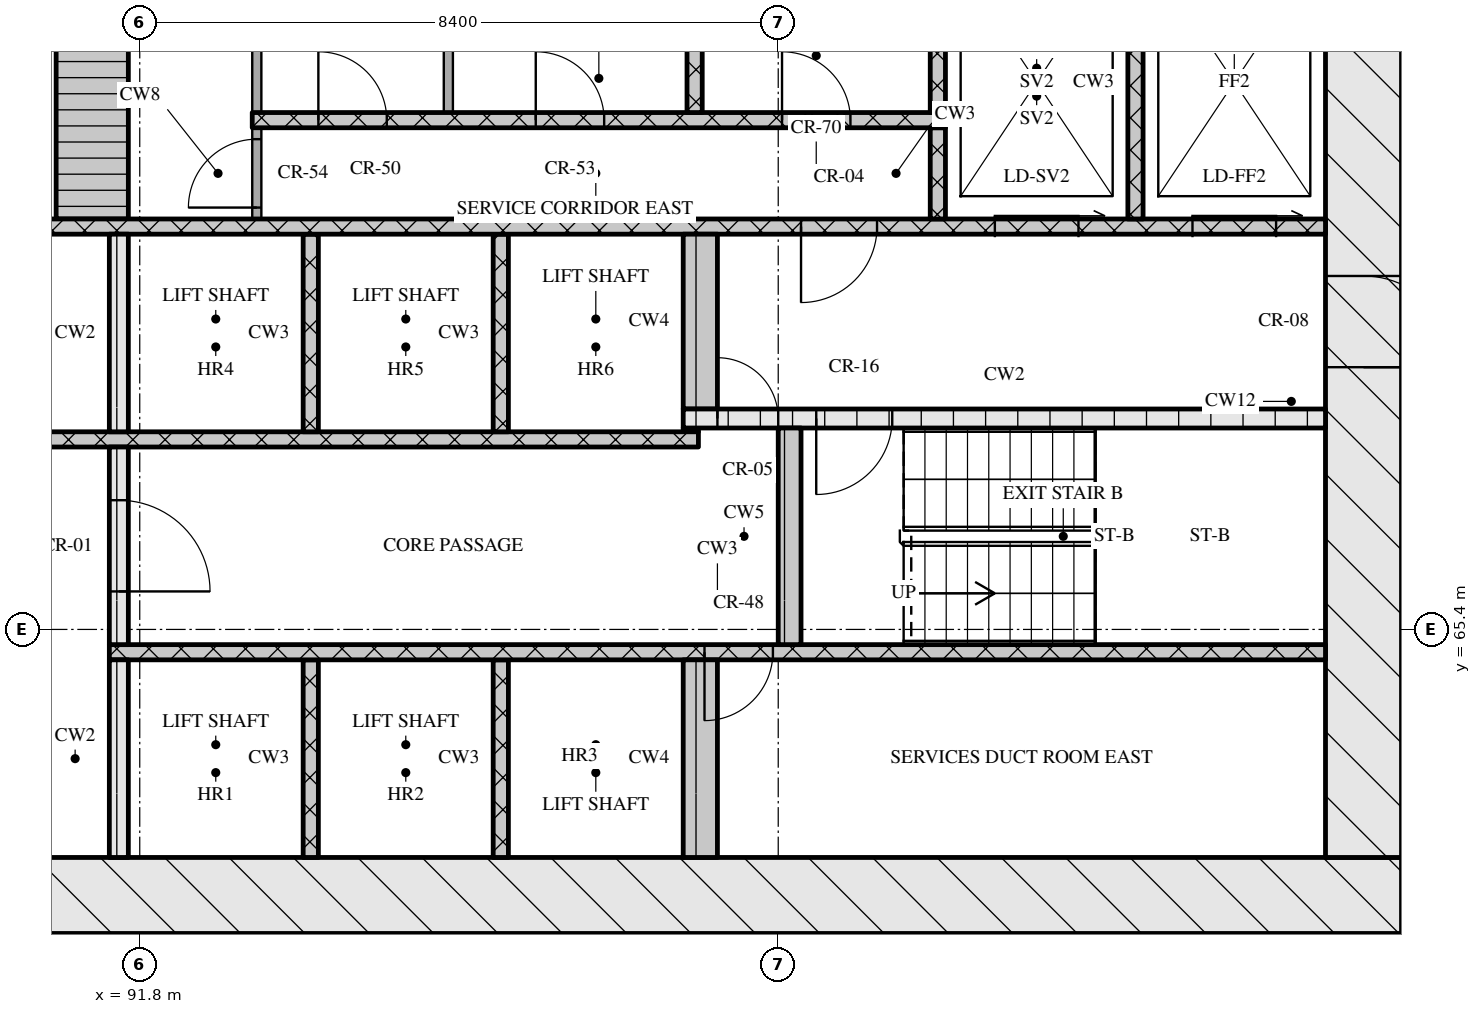
"""IFC4 building model, lengths in metres.
Left out: names, types, materials, properties, quantities, classifications, styles, units other than length and angle.
Written with IfcOpenShell. Run it as: python <this file> out.ifc"""

import sys

from ifc_helpers import new_model, si_unit, direction, frame, frame_2d, origin, place, context, subcontext, project, spatial, rectangle, extrude, element, fill, save


model = new_model("IFC4")
c1 = context("Model", 3, precision=1e-05, world=origin(), true_north=direction((0.0, 1.0)))
c2 = subcontext(c1, "Body", "Model", "MODEL_VIEW")
j1 = project(units=[si_unit("LENGTHUNIT", "METRE"), si_unit("PLANEANGLEUNIT", "RADIAN")], contexts=[c1])
p1 = place(None, origin())
s1 = spatial("IfcSite", under=j1, at=p1, CompositionType="ELEMENT")
p2 = place(p1, origin())
s2 = spatial("IfcBuilding", under=s1, at=p2, CompositionType="ELEMENT")
p3 = place(p2, frame((0.0, 0.0, 102.45)))
s3 = spatial("IfcBuildingStorey", under=s2, at=p3, CompositionType="ELEMENT", Elevation=102.45)
p4 = place(p3, frame((66.8, 61.9, 0.0), z_axis=(0.0, 0.0, 1.0), x_axis=(1.0, 0.0, 0.0)))
e1 = element("IfcWall", 1, at=p4, inside=s3, PredefinedType="SOLIDWALL", context=c2, shape_type="SweptSolid", body=[
    extrude(rectangle(XDim=41.6, YDim=1.0, at=frame_2d((20.8, 0.0))), origin(), (0.0, 0.0, 1.0), 3.32),
])
p5 = place(p4, frame((21.15, 0.0, 0.0)))
e2 = element("IfcOpeningElement", 2, at=p5, cuts=e1, PredefinedType="OPENING", context=c2, shape_type="SweptSolid", body=[
    extrude(rectangle(XDim=1.8, YDim=2.1, at=frame_2d((0.9, 1.05))), frame((0.0, 0.51, 0.0), z_axis=(0.0, -1.0, 0.0), x_axis=(1.0, 0.0, 0.0)), (0.0, 0.0, 1.0), 1.02),
])
p6 = place(p3, frame((107.9, 62.4, 0.0), z_axis=(0.0, 0.0, 1.0), x_axis=(0.0, 1.0, 0.0)))
e3 = element("IfcWall", 3, at=p6, inside=s3, PredefinedType="SOLIDWALL", context=c2, shape_type="SweptSolid", body=[
    extrude(rectangle(XDim=12.0, YDim=1.0, at=frame_2d((6.0, 0.0))), origin(), (0.0, 0.0, 1.0), 3.32),
])
p7 = place(p6, frame((6.45, 0.0, 0.0)))
e4 = element("IfcOpeningElement", 4, at=p7, cuts=e3, PredefinedType="OPENING", context=c2, shape_type="SweptSolid", body=[
    extrude(rectangle(XDim=1.2, YDim=2.1, at=frame_2d((0.6, 1.05))), frame((0.0, 0.51, 0.0), z_axis=(0.0, -1.0, 0.0), x_axis=(1.0, 0.0, 0.0)), (0.0, 0.0, 1.0), 1.02),
])
p8 = place(p3, frame((91.525, 62.4, 0.0), z_axis=(0.0, 0.0, 1.0), x_axis=(0.0, 1.0, 0.0)))
e5 = element("IfcWall", 5, at=p8, inside=s3, PredefinedType="SOLIDWALL", context=c2, shape_type="SweptSolid", body=[
    extrude(rectangle(XDim=2.6, YDim=0.25, at=frame_2d((1.3, 0.0))), origin(), (0.0, 0.0, 1.0), 3.32),
])
for number, where, z_axis, x_axis in (
    (6, (94.05, 62.4, 0.0), (0.0, 0.0, 1.0), (0.0, 1.0, 0.0)),
    (7, (96.55, 62.4, 0.0), (0.0, 0.0, 1.0), (0.0, 1.0, 0.0)),
):
    element("IfcWall", number, at=place(p3, frame(where, z_axis=z_axis, x_axis=x_axis)), inside=s3, PredefinedType="SOLIDWALL", context=c2, shape_type="SweptSolid", body=[
        extrude(rectangle(XDim=2.6, YDim=0.2, at=frame_2d((1.3, 0.0))), origin(), (0.0, 0.0, 1.0), 3.32),
    ])
p9 = place(p3, frame((99.175, 62.4, 0.0), z_axis=(0.0, 0.0, 1.0), x_axis=(0.0, 1.0, 0.0)))
e8 = element("IfcWall", 8, at=p9, inside=s3, PredefinedType="SOLIDWALL", context=c2, shape_type="SweptSolid", body=[
    extrude(rectangle(XDim=2.6, YDim=0.45, at=frame_2d((1.3, 0.0))), origin(), (0.0, 0.0, 1.0), 3.32),
])
p10 = place(p3, frame((91.4, 65.1, 0.0), z_axis=(0.0, 0.0, 1.0), x_axis=(1.0, 0.0, 0.0)))
e9 = element("IfcWall", 9, at=p10, inside=s3, PredefinedType="SOLIDWALL", context=c2, shape_type="SweptSolid", body=[
    extrude(rectangle(XDim=16.0, YDim=0.2, at=frame_2d((8.0, 0.0))), origin(), (0.0, 0.0, 1.0), 3.32),
])
p11 = place(p10, frame((7.83, 0.0, 0.0)))
e10 = element("IfcOpeningElement", 10, at=p11, cuts=e9, PredefinedType="OPENING", context=c2, shape_type="SweptSolid", body=[
    extrude(rectangle(XDim=0.9, YDim=2.1, at=frame_2d((0.45, 1.05))), frame((0.0, 0.11, 0.0), z_axis=(0.0, -1.0, 0.0), x_axis=(1.0, 0.0, 0.0)), (0.0, 0.0, 1.0), 0.22),
])
p12 = place(p3, frame((91.525, 65.2, 0.0), z_axis=(0.0, 0.0, 1.0), x_axis=(0.0, 1.0, 0.0)))
e11 = element("IfcWall", 11, at=p12, inside=s3, PredefinedType="SOLIDWALL", context=c2, shape_type="SweptSolid", body=[
    extrude(rectangle(XDim=2.6, YDim=0.25, at=frame_2d((1.3, 0.0))), origin(), (0.0, 0.0, 1.0), 3.32),
])
p13 = place(p12, frame((0.7, 0.0, 0.0)))
e12 = element("IfcOpeningElement", 12, at=p13, cuts=e11, PredefinedType="OPENING", context=c2, shape_type="SweptSolid", body=[
    extrude(rectangle(XDim=1.2, YDim=2.1, at=frame_2d((0.6, 1.05))), frame((0.0, 0.135, 0.0), z_axis=(0.0, -1.0, 0.0), x_axis=(1.0, 0.0, 0.0)), (0.0, 0.0, 1.0), 0.27),
])
p14 = place(p3, frame((100.35, 65.2, 0.0), z_axis=(0.0, 0.0, 1.0), x_axis=(0.0, 1.0, 0.0)))
e13 = element("IfcWall", 13, at=p14, inside=s3, PredefinedType="SOLIDWALL", context=c2, shape_type="SweptSolid", body=[
    extrude(rectangle(XDim=2.85, YDim=0.3, at=frame_2d((1.425, 0.0))), origin(), (0.0, 0.0, 1.0), 3.32),
])
p15 = place(p3, frame((76.05, 67.9, 0.0), z_axis=(0.0, 0.0, 1.0), x_axis=(1.0, 0.0, 0.0)))
e14 = element("IfcWall", 14, at=p15, inside=s3, PredefinedType="SOLIDWALL", context=c2, shape_type="SweptSolid", body=[
    extrude(rectangle(XDim=23.1, YDim=0.2, at=frame_2d((11.55, 0.0))), origin(), (0.0, 0.0, 1.0), 3.32),
])
p16 = place(p15, frame((0.6, 0.0, 0.0)))
e15 = element("IfcOpeningElement", 15, at=p16, cuts=e14, PredefinedType="OPENING", context=c2, shape_type="SweptSolid", body=[
    extrude(rectangle(XDim=1.1, YDim=2.1, at=frame_2d((0.55, 1.05))), frame((0.0, 0.11, 0.0), z_axis=(0.0, -1.0, 0.0), x_axis=(1.0, 0.0, 0.0)), (0.0, 0.0, 1.0), 0.22),
])
p17 = place(p15, frame((3.1, 0.0, 0.0)))
e16 = element("IfcOpeningElement", 16, at=p17, cuts=e14, PredefinedType="OPENING", context=c2, shape_type="SweptSolid", body=[
    extrude(rectangle(XDim=1.1, YDim=2.1, at=frame_2d((0.55, 1.05))), frame((0.0, 0.11, 0.0), z_axis=(0.0, -1.0, 0.0), x_axis=(1.0, 0.0, 0.0)), (0.0, 0.0, 1.0), 0.22),
])
p18 = place(p15, frame((5.6, 0.0, 0.0)))
e17 = element("IfcOpeningElement", 17, at=p18, cuts=e14, PredefinedType="OPENING", context=c2, shape_type="SweptSolid", body=[
    extrude(rectangle(XDim=1.1, YDim=2.1, at=frame_2d((0.55, 1.05))), frame((0.0, 0.11, 0.0), z_axis=(0.0, -1.0, 0.0), x_axis=(1.0, 0.0, 0.0)), (0.0, 0.0, 1.0), 0.22),
])
p19 = place(p15, frame((8.45, 0.0, 0.0)))
e18 = element("IfcOpeningElement", 18, at=p19, cuts=e14, PredefinedType="OPENING", context=c2, shape_type="SweptSolid", body=[
    extrude(rectangle(XDim=0.9, YDim=2.1, at=frame_2d((0.45, 1.05))), frame((0.0, 0.11, 0.0), z_axis=(0.0, -1.0, 0.0), x_axis=(1.0, 0.0, 0.0)), (0.0, 0.0, 1.0), 0.22),
])
p20 = place(p15, frame((10.91, 0.0, 0.0)))
e19 = element("IfcOpeningElement", 19, at=p20, cuts=e14, PredefinedType="OPENING", context=c2, shape_type="SweptSolid", body=[
    extrude(rectangle(XDim=0.9, YDim=2.1, at=frame_2d((0.45, 1.05))), frame((0.0, 0.11, 0.0), z_axis=(0.0, -1.0, 0.0), x_axis=(1.0, 0.0, 0.0)), (0.0, 0.0, 1.0), 0.22),
])
p21 = place(p15, frame((13.55, 0.0, 0.0)))
e20 = element("IfcOpeningElement", 20, at=p21, cuts=e14, PredefinedType="OPENING", context=c2, shape_type="SweptSolid", body=[
    extrude(rectangle(XDim=1.0, YDim=2.1, at=frame_2d((0.5, 1.05))), frame((0.0, 0.11, 0.0), z_axis=(0.0, -1.0, 0.0), x_axis=(1.0, 0.0, 0.0)), (0.0, 0.0, 1.0), 0.22),
])
p22 = place(p3, frame((91.525, 68.0, 0.0), z_axis=(0.0, 0.0, 1.0), x_axis=(0.0, 1.0, 0.0)))
e21 = element("IfcWall", 21, at=p22, inside=s3, PredefinedType="SOLIDWALL", context=c2, shape_type="SweptSolid", body=[
    extrude(rectangle(XDim=2.6, YDim=0.25, at=frame_2d((1.3, 0.0))), origin(), (0.0, 0.0, 1.0), 3.32),
])
for number, where, z_axis, x_axis in (
    (22, (94.05, 68.0, 0.0), (0.0, 0.0, 1.0), (0.0, 1.0, 0.0)),
    (23, (96.55, 68.0, 0.0), (0.0, 0.0, 1.0), (0.0, 1.0, 0.0)),
):
    element("IfcWall", number, at=place(p3, frame(where, z_axis=z_axis, x_axis=x_axis)), inside=s3, PredefinedType="SOLIDWALL", context=c2, shape_type="SweptSolid", body=[
        extrude(rectangle(XDim=2.6, YDim=0.2, at=frame_2d((1.3, 0.0))), origin(), (0.0, 0.0, 1.0), 3.32),
    ])
p23 = place(p3, frame((98.95, 68.025, 0.0), z_axis=(0.0, 0.0, 1.0), x_axis=(1.0, 0.0, 0.0)))
e24 = element("IfcWall", 24, at=p23, inside=s3, PredefinedType="SOLIDWALL", context=c2, shape_type="SweptSolid", body=[
    extrude(rectangle(XDim=0.2, YDim=0.05, at=frame_2d((0.1, 0.0))), origin(), (0.0, 0.0, 1.0), 3.32),
])
p24 = place(p3, frame((98.95, 68.175, 0.0), z_axis=(0.0, 0.0, 1.0), x_axis=(1.0, 0.0, 0.0)))
e25 = element("IfcWall", 25, at=p24, inside=s3, PredefinedType="SOLIDWALL", context=c2, shape_type="SweptSolid", body=[
    extrude(rectangle(XDim=8.45, YDim=0.25, at=frame_2d((4.225, 0.0))), origin(), (0.0, 0.0, 1.0), 3.32),
])
p25 = place(p24, frame((0.45, 0.0, 0.0)))
e26 = element("IfcOpeningElement", 26, at=p25, cuts=e25, PredefinedType="OPENING", context=c2, shape_type="SweptSolid", body=[
    extrude(rectangle(XDim=0.8, YDim=2.1, at=frame_2d((0.4, 1.05))), frame((0.0, 0.135, 0.0), z_axis=(0.0, -1.0, 0.0), x_axis=(1.0, 0.0, 0.0)), (0.0, 0.0, 1.0), 0.27),
])
p26 = place(p24, frame((1.75, 0.0, 0.0)))
e27 = element("IfcOpeningElement", 27, at=p26, cuts=e25, PredefinedType="OPENING", context=c2, shape_type="SweptSolid", body=[
    extrude(rectangle(XDim=1.0, YDim=2.1, at=frame_2d((0.5, 1.05))), frame((0.0, 0.135, 0.0), z_axis=(0.0, -1.0, 0.0), x_axis=(1.0, 0.0, 0.0)), (0.0, 0.0, 1.0), 0.27),
])
p27 = place(p3, frame((99.175, 68.3, 0.0), z_axis=(0.0, 0.0, 1.0), x_axis=(0.0, 1.0, 0.0)))
e28 = element("IfcWall", 28, at=p27, inside=s3, PredefinedType="SOLIDWALL", context=c2, shape_type="SweptSolid", body=[
    extrude(rectangle(XDim=2.3, YDim=0.45, at=frame_2d((1.15, 0.0))), origin(), (0.0, 0.0, 1.0), 3.32),
])
p28 = place(p3, frame((67.8, 70.7, 0.0), z_axis=(0.0, 0.0, 1.0), x_axis=(1.0, 0.0, 0.0)))
e29 = element("IfcWall", 29, at=p28, inside=s3, PredefinedType="SOLIDWALL", context=c2, shape_type="SweptSolid", body=[
    extrude(rectangle(XDim=39.6, YDim=0.2, at=frame_2d((19.8, 0.0))), origin(), (0.0, 0.0, 1.0), 3.32),
])
p29 = place(p28, frame((0.65, 0.0, 0.0)))
e30 = element("IfcOpeningElement", 30, at=p29, cuts=e29, PredefinedType="OPENING", context=c2, shape_type="SweptSolid", body=[
    extrude(rectangle(XDim=1.1, YDim=2.1, at=frame_2d((0.55, 1.05))), frame((0.0, 0.11, 0.0), z_axis=(0.0, -1.0, 0.0), x_axis=(1.0, 0.0, 0.0)), (0.0, 0.0, 1.0), 0.22),
])
p30 = place(p28, frame((3.25, 0.0, 0.0)))
e31 = element("IfcOpeningElement", 31, at=p30, cuts=e29, PredefinedType="OPENING", context=c2, shape_type="SweptSolid", body=[
    extrude(rectangle(XDim=1.1, YDim=2.1, at=frame_2d((0.55, 1.05))), frame((0.0, 0.11, 0.0), z_axis=(0.0, -1.0, 0.0), x_axis=(1.0, 0.0, 0.0)), (0.0, 0.0, 1.0), 0.22),
])
p31 = place(p28, frame((5.9, 0.0, 0.0)))
e32 = element("IfcOpeningElement", 32, at=p31, cuts=e29, PredefinedType="OPENING", context=c2, shape_type="SweptSolid", body=[
    extrude(rectangle(XDim=1.0, YDim=2.1, at=frame_2d((0.5, 1.05))), frame((0.0, 0.11, 0.0), z_axis=(0.0, -1.0, 0.0), x_axis=(1.0, 0.0, 0.0)), (0.0, 0.0, 1.0), 0.22),
])
p32 = place(p28, frame((21.7, 0.0, 0.0)))
e33 = element("IfcOpeningElement", 33, at=p32, cuts=e29, PredefinedType="OPENING", context=c2, shape_type="SweptSolid", body=[
    extrude(rectangle(XDim=1.0, YDim=2.1, at=frame_2d((0.5, 1.05))), frame((0.0, 0.11, 0.0), z_axis=(0.0, -1.0, 0.0), x_axis=(1.0, 0.0, 0.0)), (0.0, 0.0, 1.0), 0.22),
])
p33 = place(p28, frame((32.7, 0.0, 0.0)))
e34 = element("IfcOpeningElement", 34, at=p33, cuts=e29, PredefinedType="OPENING", context=c2, shape_type="SweptSolid", body=[
    extrude(rectangle(XDim=1.0, YDim=2.1, at=frame_2d((0.5, 1.05))), frame((0.0, 0.11, 0.0), z_axis=(0.0, -1.0, 0.0), x_axis=(1.0, 0.0, 0.0)), (0.0, 0.0, 1.0), 0.22),
])
p34 = place(p28, frame((35.25, 0.0, 0.0)))
e35 = element("IfcOpeningElement", 35, at=p34, cuts=e29, PredefinedType="OPENING", context=c2, shape_type="SweptSolid", body=[
    extrude(rectangle(XDim=1.1, YDim=2.1, at=frame_2d((0.55, 1.05))), frame((0.0, 0.11, 0.0), z_axis=(0.0, -1.0, 0.0), x_axis=(1.0, 0.0, 0.0)), (0.0, 0.0, 1.0), 0.22),
])
p35 = place(p28, frame((37.85, 0.0, 0.0)))
e36 = element("IfcOpeningElement", 36, at=p35, cuts=e29, PredefinedType="OPENING", context=c2, shape_type="SweptSolid", body=[
    extrude(rectangle(XDim=1.1, YDim=2.1, at=frame_2d((0.55, 1.05))), frame((0.0, 0.11, 0.0), z_axis=(0.0, -1.0, 0.0), x_axis=(1.0, 0.0, 0.0)), (0.0, 0.0, 1.0), 0.22),
])
p36 = place(p3, frame((91.175, 70.8, 0.0), z_axis=(0.0, 0.0, 1.0), x_axis=(0.0, 1.0, 0.0)))
e37 = element("IfcWall", 37, at=p36, inside=s3, PredefinedType="SOLIDWALL", context=c2, shape_type="SweptSolid", body=[
    extrude(rectangle(XDim=2.95, YDim=0.95, at=frame_2d((1.475, 0.0))), origin(), (0.0, 0.0, 1.0), 3.32),
])
p37 = place(p3, frame((93.34, 70.8, 0.0), z_axis=(0.0, 0.0, 1.0), x_axis=(0.0, 1.0, 0.0)))
e38 = element("IfcWall", 38, at=p37, inside=s3, PredefinedType="PARTITIONING", context=c2, shape_type="SweptSolid", body=[
    extrude(rectangle(XDim=1.2, YDim=0.12, at=frame_2d((0.6, 0.0))), origin(), (0.0, 0.0, 1.0), 3.32),
])
p38 = place(p37, frame((0.15, 0.0, 0.0)))
e39 = element("IfcOpeningElement", 39, at=p38, cuts=e38, PredefinedType="OPENING", context=c2, shape_type="SweptSolid", body=[
    extrude(rectangle(XDim=0.9, YDim=2.1, at=frame_2d((0.45, 1.05))), frame((0.0, 0.07, 0.0), z_axis=(0.0, -1.0, 0.0), x_axis=(1.0, 0.0, 0.0)), (0.0, 0.0, 1.0), 0.14),
])
p39 = place(p3, frame((102.3, 70.8, 0.0), z_axis=(0.0, 0.0, 1.0), x_axis=(0.0, 1.0, 0.0)))
e40 = element("IfcWall", 40, at=p39, inside=s3, PredefinedType="SOLIDWALL", context=c2, shape_type="SweptSolid", body=[
    extrude(rectangle(XDim=1.2, YDim=0.2, at=frame_2d((0.6, 0.0))), origin(), (0.0, 0.0, 1.0), 3.32),
])
p40 = place(p3, frame((104.9, 70.8, 0.0), z_axis=(0.0, 0.0, 1.0), x_axis=(0.0, 1.0, 0.0)))
e41 = element("IfcWall", 41, at=p40, inside=s3, PredefinedType="SOLIDWALL", context=c2, shape_type="SweptSolid", body=[
    extrude(rectangle(XDim=3.6, YDim=0.2, at=frame_2d((1.8, 0.0))), origin(), (0.0, 0.0, 1.0), 3.32),
])
p41 = place(p3, frame((93.28, 72.1, 0.0), z_axis=(0.0, 0.0, 1.0), x_axis=(1.0, 0.0, 0.0)))
e42 = element("IfcWall", 42, at=p41, inside=s3, PredefinedType="SOLIDWALL", context=c2, shape_type="SweptSolid", body=[
    extrude(rectangle(XDim=9.12, YDim=0.2, at=frame_2d((4.56, 0.0))), origin(), (0.0, 0.0, 1.0), 3.32),
])
p42 = place(p41, frame((0.87, 0.0, 0.0)))
e43 = element("IfcOpeningElement", 43, at=p42, cuts=e42, PredefinedType="OPENING", context=c2, shape_type="SweptSolid", body=[
    extrude(rectangle(XDim=0.9, YDim=2.1, at=frame_2d((0.45, 1.05))), frame((0.0, 0.11, 0.0), z_axis=(0.0, -1.0, 0.0), x_axis=(1.0, 0.0, 0.0)), (0.0, 0.0, 1.0), 0.22),
])
p43 = place(p41, frame((3.73, 0.0, 0.0)))
e44 = element("IfcOpeningElement", 44, at=p43, cuts=e42, PredefinedType="OPENING", context=c2, shape_type="SweptSolid", body=[
    extrude(rectangle(XDim=0.9, YDim=2.1, at=frame_2d((0.45, 1.05))), frame((0.0, 0.11, 0.0), z_axis=(0.0, -1.0, 0.0), x_axis=(1.0, 0.0, 0.0)), (0.0, 0.0, 1.0), 0.22),
])
p44 = place(p41, frame((6.97, 0.0, 0.0)))
e45 = element("IfcOpeningElement", 45, at=p44, cuts=e42, PredefinedType="OPENING", context=c2, shape_type="SweptSolid", body=[
    extrude(rectangle(XDim=0.9, YDim=2.1, at=frame_2d((0.45, 1.05))), frame((0.0, 0.11, 0.0), z_axis=(0.0, -1.0, 0.0), x_axis=(1.0, 0.0, 0.0)), (0.0, 0.0, 1.0), 0.22),
])
for number, where, z_axis, x_axis in (
    (46, (93.34, 72.2, 0.0), (0.0, 0.0, 1.0), (0.0, 1.0, 0.0)),
    (47, (95.86, 72.2, 0.0), (0.0, 0.0, 1.0), (0.0, 1.0, 0.0)),
):
    element("IfcWall", number, at=place(p3, frame(where, z_axis=z_axis, x_axis=x_axis)), inside=s3, PredefinedType="PARTITIONING", context=c2, shape_type="SweptSolid", body=[
        extrude(rectangle(XDim=2.2, YDim=0.12, at=frame_2d((1.1, 0.0))), origin(), (0.0, 0.0, 1.0), 3.32),
    ])
for number, where, z_axis, x_axis in (
    (48, (99.1, 72.2, 0.0), (0.0, 0.0, 1.0), (0.0, 1.0, 0.0)),
    (49, (102.3, 72.2, 0.0), (0.0, 0.0, 1.0), (0.0, 1.0, 0.0)),
):
    element("IfcWall", number, at=place(p3, frame(where, z_axis=z_axis, x_axis=x_axis)), inside=s3, PredefinedType="SOLIDWALL", context=c2, shape_type="SweptSolid", body=[
        extrude(rectangle(XDim=2.2, YDim=0.2, at=frame_2d((1.1, 0.0))), origin(), (0.0, 0.0, 1.0), 3.32),
    ])
p45 = place(p11, origin())
e50 = element("IfcDoor", 50, at=p45, inside=s3, OperationType="SINGLE_SWING_RIGHT", PredefinedType="DOOR", context=c2, shape_type="SweptSolid", body=[
    extrude(rectangle(XDim=0.9, YDim=2.1, at=frame_2d((0.45, 1.05))), frame((0.0, 0.025, 0.0), z_axis=(0.0, -1.0, 0.0), x_axis=(1.0, 0.0, 0.0)), (0.0, 0.0, 1.0), 0.05),
])
fill(e10, e50)
p46 = place(p13, origin())
e51 = element("IfcDoor", 51, at=p46, inside=s3, OperationType="SINGLE_SWING_RIGHT", PredefinedType="DOOR", context=c2, shape_type="SweptSolid", body=[
    extrude(rectangle(XDim=1.2, YDim=2.1, at=frame_2d((0.6, 1.05))), frame((0.0, 0.025, 0.0), z_axis=(0.0, -1.0, 0.0), x_axis=(1.0, 0.0, 0.0)), (0.0, 0.0, 1.0), 0.05),
])
fill(e12, e51)
p47 = place(p25, origin())
e52 = element("IfcDoor", 52, at=p47, inside=s3, OperationType="SINGLE_SWING_LEFT", PredefinedType="DOOR", context=c2, shape_type="SweptSolid", body=[
    extrude(rectangle(XDim=0.8, YDim=2.1, at=frame_2d((0.4, 1.05))), frame((0.0, 0.025, 0.0), z_axis=(0.0, -1.0, 0.0), x_axis=(1.0, 0.0, 0.0)), (0.0, 0.0, 1.0), 0.05),
])
fill(e26, e52)
p48 = place(p26, origin())
e53 = element("IfcDoor", 53, at=p48, inside=s3, OperationType="SINGLE_SWING_RIGHT", PredefinedType="DOOR", context=c2, shape_type="SweptSolid", body=[
    extrude(rectangle(XDim=1.0, YDim=2.1, at=frame_2d((0.5, 1.05))), frame((0.0, 0.025, 0.0), z_axis=(0.0, -1.0, 0.0), x_axis=(1.0, 0.0, 0.0)), (0.0, 0.0, 1.0), 0.05),
])
fill(e27, e53)
p49 = place(p7, origin())
e54 = element("IfcDoor", 54, at=p49, inside=s3, OperationType="SINGLE_SWING_RIGHT", PredefinedType="DOOR", context=c2, shape_type="SweptSolid", body=[
    extrude(rectangle(XDim=1.2, YDim=2.1, at=frame_2d((0.6, 1.05))), frame((0.0, 0.025, 0.0), z_axis=(0.0, -1.0, 0.0), x_axis=(1.0, 0.0, 0.0)), (0.0, 0.0, 1.0), 0.05),
])
fill(e4, e54)
p50 = place(p33, origin())
e55 = element("IfcDoor", 55, at=p50, inside=s3, OperationType="SINGLE_SWING_RIGHT", PredefinedType="DOOR", context=c2, shape_type="SweptSolid", body=[
    extrude(rectangle(XDim=1.0, YDim=2.1, at=frame_2d((0.5, 1.05))), frame((0.0, 0.025, 0.0), z_axis=(0.0, -1.0, 0.0), x_axis=(1.0, 0.0, 0.0)), (0.0, 0.0, 1.0), 0.05),
])
fill(e34, e55)
p51 = place(p34, origin())
e56 = element("IfcDoor", 56, at=p51, inside=s3, OperationType="SLIDING_TO_RIGHT", PredefinedType="DOOR", context=c2, shape_type="SweptSolid", body=[
    extrude(rectangle(XDim=1.1, YDim=2.1, at=frame_2d((0.55, 1.05))), frame((0.0, 0.025, 0.0), z_axis=(0.0, -1.0, 0.0), x_axis=(1.0, 0.0, 0.0)), (0.0, 0.0, 1.0), 0.05),
])
fill(e35, e56)
p52 = place(p35, origin())
e57 = element("IfcDoor", 57, at=p52, inside=s3, OperationType="SLIDING_TO_RIGHT", PredefinedType="DOOR", context=c2, shape_type="SweptSolid", body=[
    extrude(rectangle(XDim=1.1, YDim=2.1, at=frame_2d((0.55, 1.05))), frame((0.0, 0.025, 0.0), z_axis=(0.0, -1.0, 0.0), x_axis=(1.0, 0.0, 0.0)), (0.0, 0.0, 1.0), 0.05),
])
fill(e36, e57)
p53 = place(p38, origin())
e58 = element("IfcDoor", 58, at=p53, inside=s3, OperationType="SINGLE_SWING_LEFT", PredefinedType="DOOR", context=c2, shape_type="SweptSolid", body=[
    extrude(rectangle(XDim=0.9, YDim=2.1, at=frame_2d((0.45, 1.05))), frame((0.0, 0.025, 0.0), z_axis=(0.0, -1.0, 0.0), x_axis=(1.0, 0.0, 0.0)), (0.0, 0.0, 1.0), 0.05),
])
fill(e39, e58)
p54 = place(p42, origin())
e59 = element("IfcDoor", 59, at=p54, inside=s3, OperationType="SINGLE_SWING_LEFT", PredefinedType="DOOR", context=c2, shape_type="SweptSolid", body=[
    extrude(rectangle(XDim=0.9, YDim=2.1, at=frame_2d((0.45, 1.05))), frame((0.0, 0.025, 0.0), z_axis=(0.0, -1.0, 0.0), x_axis=(1.0, 0.0, 0.0)), (0.0, 0.0, 1.0), 0.05),
])
fill(e43, e59)
p55 = place(p43, origin())
e60 = element("IfcDoor", 60, at=p55, inside=s3, OperationType="SINGLE_SWING_LEFT", PredefinedType="DOOR", context=c2, shape_type="SweptSolid", body=[
    extrude(rectangle(XDim=0.9, YDim=2.1, at=frame_2d((0.45, 1.05))), frame((0.0, 0.025, 0.0), z_axis=(0.0, -1.0, 0.0), x_axis=(1.0, 0.0, 0.0)), (0.0, 0.0, 1.0), 0.05),
])
fill(e44, e60)
p56 = place(p44, origin())
e61 = element("IfcDoor", 61, at=p56, inside=s3, OperationType="SINGLE_SWING_LEFT", PredefinedType="DOOR", context=c2, shape_type="SweptSolid", body=[
    extrude(rectangle(XDim=0.9, YDim=2.1, at=frame_2d((0.45, 1.05))), frame((0.0, 0.025, 0.0), z_axis=(0.0, -1.0, 0.0), x_axis=(1.0, 0.0, 0.0)), (0.0, 0.0, 1.0), 0.05),
])
fill(e45, e61)
save(model, sys.argv[1])
